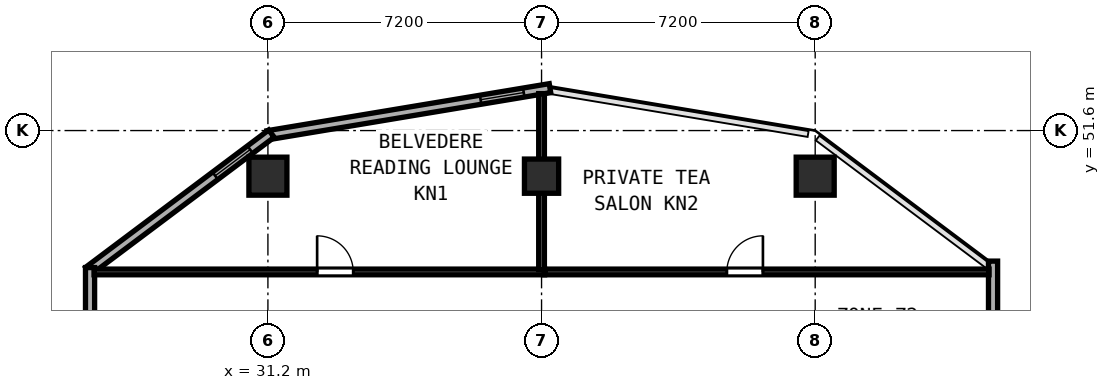
"""IFC4 building model, lengths in metres.
Left out: names, types, materials, properties, quantities, classifications, styles, units other than length and angle.
Written with IfcOpenShell. Run it as: python <this file> out.ifc"""

import sys

from ifc_helpers import new_model, si_unit, direction, frame, frame_2d, origin, origin_2d, place, context, subcontext, project, spatial, rectangle, hollow_rectangle, extrude, element, fill, save


model = new_model("IFC4")
c1 = context("Model", 3, precision=1e-05, world=origin(), true_north=direction((0.0, 1.0)))
c2 = subcontext(c1, "Body", "Model", "MODEL_VIEW")
j1 = project(units=[si_unit("LENGTHUNIT", "METRE"), si_unit("PLANEANGLEUNIT", "RADIAN")], contexts=[c1])
p1 = place(None, origin())
s1 = spatial("IfcSite", under=j1, at=p1, CompositionType="ELEMENT")
p2 = place(p1, origin())
s2 = spatial("IfcBuilding", under=s1, at=p2, CompositionType="ELEMENT")
p3 = place(p2, frame((0.0, 0.0, 113.6)))
s3 = spatial("IfcBuildingStorey", under=s2, at=p3, CompositionType="ELEMENT", Elevation=113.6)
for number, where, z_axis, x_axis in (
    (1, (31.2, 50.4, 0.0), (0.0, 0.0, 1.0), (1.0, 0.0, 0.0)),
    (2, (45.6, 50.4, 0.0), (0.0, 0.0, 1.0), (1.0, 0.0, 0.0)),
):
    element("IfcColumn", number, at=place(p3, frame(where, z_axis=z_axis, x_axis=x_axis)), inside=s3, PredefinedType="COLUMN", context=c2, shape_type="SweptSolid", body=[
        extrude(hollow_rectangle(XDim=1.0, YDim=1.0, WallThickness=0.038, at=origin_2d()), origin(), (0.0, 0.0, 1.0), 3.8),
    ])
p4 = place(p3, frame((38.4, 50.4, 0.0), z_axis=(0.0, 0.0, 1.0), x_axis=(1.0, 0.0, 0.0)))
e3 = element("IfcColumn", 3, at=p4, inside=s3, PredefinedType="COLUMN", context=c2, shape_type="SweptSolid", body=[
    extrude(hollow_rectangle(XDim=0.9, YDim=0.9, WallThickness=0.034, at=origin_2d()), origin(), (0.0, 0.0, 1.0), 3.8),
])
p5 = place(p3, frame((50.28, 46.625, 0.0), z_axis=(0.0, 0.0, 1.0), x_axis=(0.0, 1.0, 0.0)))
e4 = element("IfcWall", 4, at=p5, inside=s3, PredefinedType="SOLIDWALL", context=c2, shape_type="SweptSolid", body=[
    extrude(rectangle(XDim=1.54, YDim=0.24, at=frame_2d((0.77, 0.0))), origin(), (0.0, 0.0, 1.0), 3.6),
])
p6 = place(p3, frame((38.622, 52.715, 0.0), z_axis=(0.0, 0.0, 1.0), x_axis=(-0.98639129485, -0.164414760418, 0.0)))
e5 = element("IfcWall", 5, at=p6, inside=s3, PredefinedType="SOLIDWALL", context=c2, shape_type="SweptSolid", body=[
    extrude(rectangle(XDim=7.53, YDim=0.24, at=frame_2d((3.765, 0.0))), origin(), (0.0, 0.0, 1.0), 3.6),
])
p7 = place(p6, frame((0.7, 0.0, 0.85)))
e6 = element("IfcOpeningElement", 6, at=p7, cuts=e5, PredefinedType="OPENING", context=c2, shape_type="SweptSolid", body=[
    extrude(rectangle(XDim=1.15, YDim=1.8, at=frame_2d((0.575, 0.9))), frame((0.0, 0.13, 0.0), z_axis=(0.0, -1.0, 0.0), x_axis=(1.0, 0.0, 0.0)), (0.0, 0.0, 1.0), 0.26),
])
p8 = place(p3, frame((31.292, 51.519, 0.0), z_axis=(0.0, 0.0, 1.0), x_axis=(-0.8, -0.6, 0.0)))
e7 = element("IfcWall", 7, at=p8, inside=s3, PredefinedType="SOLIDWALL", context=c2, shape_type="SweptSolid", body=[
    extrude(rectangle(XDim=6.021, YDim=0.24, at=frame_2d((3.01, 0.0))), origin(), (0.0, 0.0, 1.0), 3.6),
])
p9 = place(p8, frame((0.7, 0.0, 0.85)))
e8 = element("IfcOpeningElement", 8, at=p9, cuts=e7, PredefinedType="OPENING", context=c2, shape_type="SweptSolid", body=[
    extrude(rectangle(XDim=1.15, YDim=1.8, at=frame_2d((0.575, 0.9))), frame((0.0, 0.13, 0.0), z_axis=(0.0, -1.0, 0.0), x_axis=(1.0, 0.0, 0.0)), (0.0, 0.0, 1.0), 0.26),
])
p10 = place(p3, frame((26.52, 47.995, 0.0), z_axis=(0.0, 0.0, 1.0), x_axis=(0.0, -1.0, 0.0)))
e9 = element("IfcWall", 9, at=p10, inside=s3, PredefinedType="SOLIDWALL", context=c2, shape_type="SweptSolid", body=[
    extrude(rectangle(XDim=1.37, YDim=0.24, at=frame_2d((0.685, 0.0))), origin(), (0.0, 0.0, 1.0), 3.6),
])
p11 = place(p3, frame((26.625, 47.88, 0.0), z_axis=(0.0, 0.0, 1.0), x_axis=(1.0, 0.0, 0.0)))
e10 = element("IfcWall", 10, at=p11, inside=s3, PredefinedType="PARTITIONING", context=c2, shape_type="SweptSolid", body=[
    extrude(rectangle(XDim=11.855, YDim=0.15, at=frame_2d((5.927, 0.0))), origin(), (0.0, 0.0, 1.0), 3.6),
])
p12 = place(p11, frame((5.87, 0.0, 0.0)))
e11 = element("IfcOpeningElement", 11, at=p12, cuts=e10, PredefinedType="OPENING", context=c2, shape_type="SweptSolid", body=[
    extrude(rectangle(XDim=0.95, YDim=2.12, at=frame_2d((0.475, 1.06))), frame((0.0, 0.085, 0.0), z_axis=(0.0, -1.0, 0.0), x_axis=(1.0, 0.0, 0.0)), (0.0, 0.0, 1.0), 0.17),
])
p13 = place(p3, frame((38.4, 47.94, 0.0), z_axis=(0.0, 0.0, 1.0), x_axis=(0.0, 1.0, 0.0)))
e12 = element("IfcWall", 12, at=p13, inside=s3, PredefinedType="PARTITIONING", context=c2, shape_type="SweptSolid", body=[
    extrude(rectangle(XDim=4.632, YDim=0.15, at=frame_2d((2.316, 0.0))), origin(), (0.0, 0.0, 1.0), 3.6),
])
p14 = place(p3, frame((38.482, 47.88, 0.0), z_axis=(0.0, 0.0, 1.0), x_axis=(1.0, 0.0, 0.0)))
e13 = element("IfcWall", 13, at=p14, inside=s3, PredefinedType="PARTITIONING", context=c2, shape_type="SweptSolid", body=[
    extrude(rectangle(XDim=11.693, YDim=0.15, at=frame_2d((5.847, 0.0))), origin(), (0.0, 0.0, 1.0), 3.6),
])
p15 = place(p14, frame((4.793, 0.0, 0.0)))
e14 = element("IfcOpeningElement", 14, at=p15, cuts=e13, PredefinedType="OPENING", context=c2, shape_type="SweptSolid", body=[
    extrude(rectangle(XDim=0.95, YDim=2.12, at=frame_2d((0.475, 1.06))), frame((0.0, 0.085, 0.0), z_axis=(0.0, -1.0, 0.0), x_axis=(1.0, 0.0, 0.0)), (0.0, 0.0, 1.0), 0.17),
])
p16 = place(p7, origin())
e15 = element("IfcWindow", 15, at=p16, inside=s3, PartitioningType="SINGLE_PANEL", PredefinedType="WINDOW", context=c2, shape_type="SweptSolid", body=[
    extrude(rectangle(XDim=1.15, YDim=1.8, at=frame_2d((0.575, 0.9))), frame((0.0, 0.03, 0.0), z_axis=(0.0, -1.0, 0.0), x_axis=(1.0, 0.0, 0.0)), (0.0, 0.0, 1.0), 0.06),
])
fill(e6, e15)
p17 = place(p9, origin())
e16 = element("IfcWindow", 16, at=p17, inside=s3, PartitioningType="SINGLE_PANEL", PredefinedType="WINDOW", context=c2, shape_type="SweptSolid", body=[
    extrude(rectangle(XDim=1.15, YDim=1.8, at=frame_2d((0.575, 0.9))), frame((0.0, 0.03, 0.0), z_axis=(0.0, -1.0, 0.0), x_axis=(1.0, 0.0, 0.0)), (0.0, 0.0, 1.0), 0.06),
])
fill(e8, e16)
p18 = place(p12, origin())
e17 = element("IfcDoor", 17, at=p18, inside=s3, OperationType="SINGLE_SWING_LEFT", PredefinedType="DOOR", context=c2, shape_type="SweptSolid", body=[
    extrude(rectangle(XDim=0.95, YDim=2.12, at=frame_2d((0.475, 1.06))), frame((0.0, 0.025, 0.0), z_axis=(0.0, -1.0, 0.0), x_axis=(1.0, 0.0, 0.0)), (0.0, 0.0, 1.0), 0.05),
])
fill(e11, e17)
p19 = place(p15, origin())
e18 = element("IfcDoor", 18, at=p19, inside=s3, OperationType="SINGLE_SWING_RIGHT", PredefinedType="DOOR", context=c2, shape_type="SweptSolid", body=[
    extrude(rectangle(XDim=0.95, YDim=2.12, at=frame_2d((0.475, 1.06))), frame((0.0, 0.025, 0.0), z_axis=(0.0, -1.0, 0.0), x_axis=(1.0, 0.0, 0.0)), (0.0, 0.0, 1.0), 0.05),
])
fill(e14, e18)
save(model, sys.argv[1])
